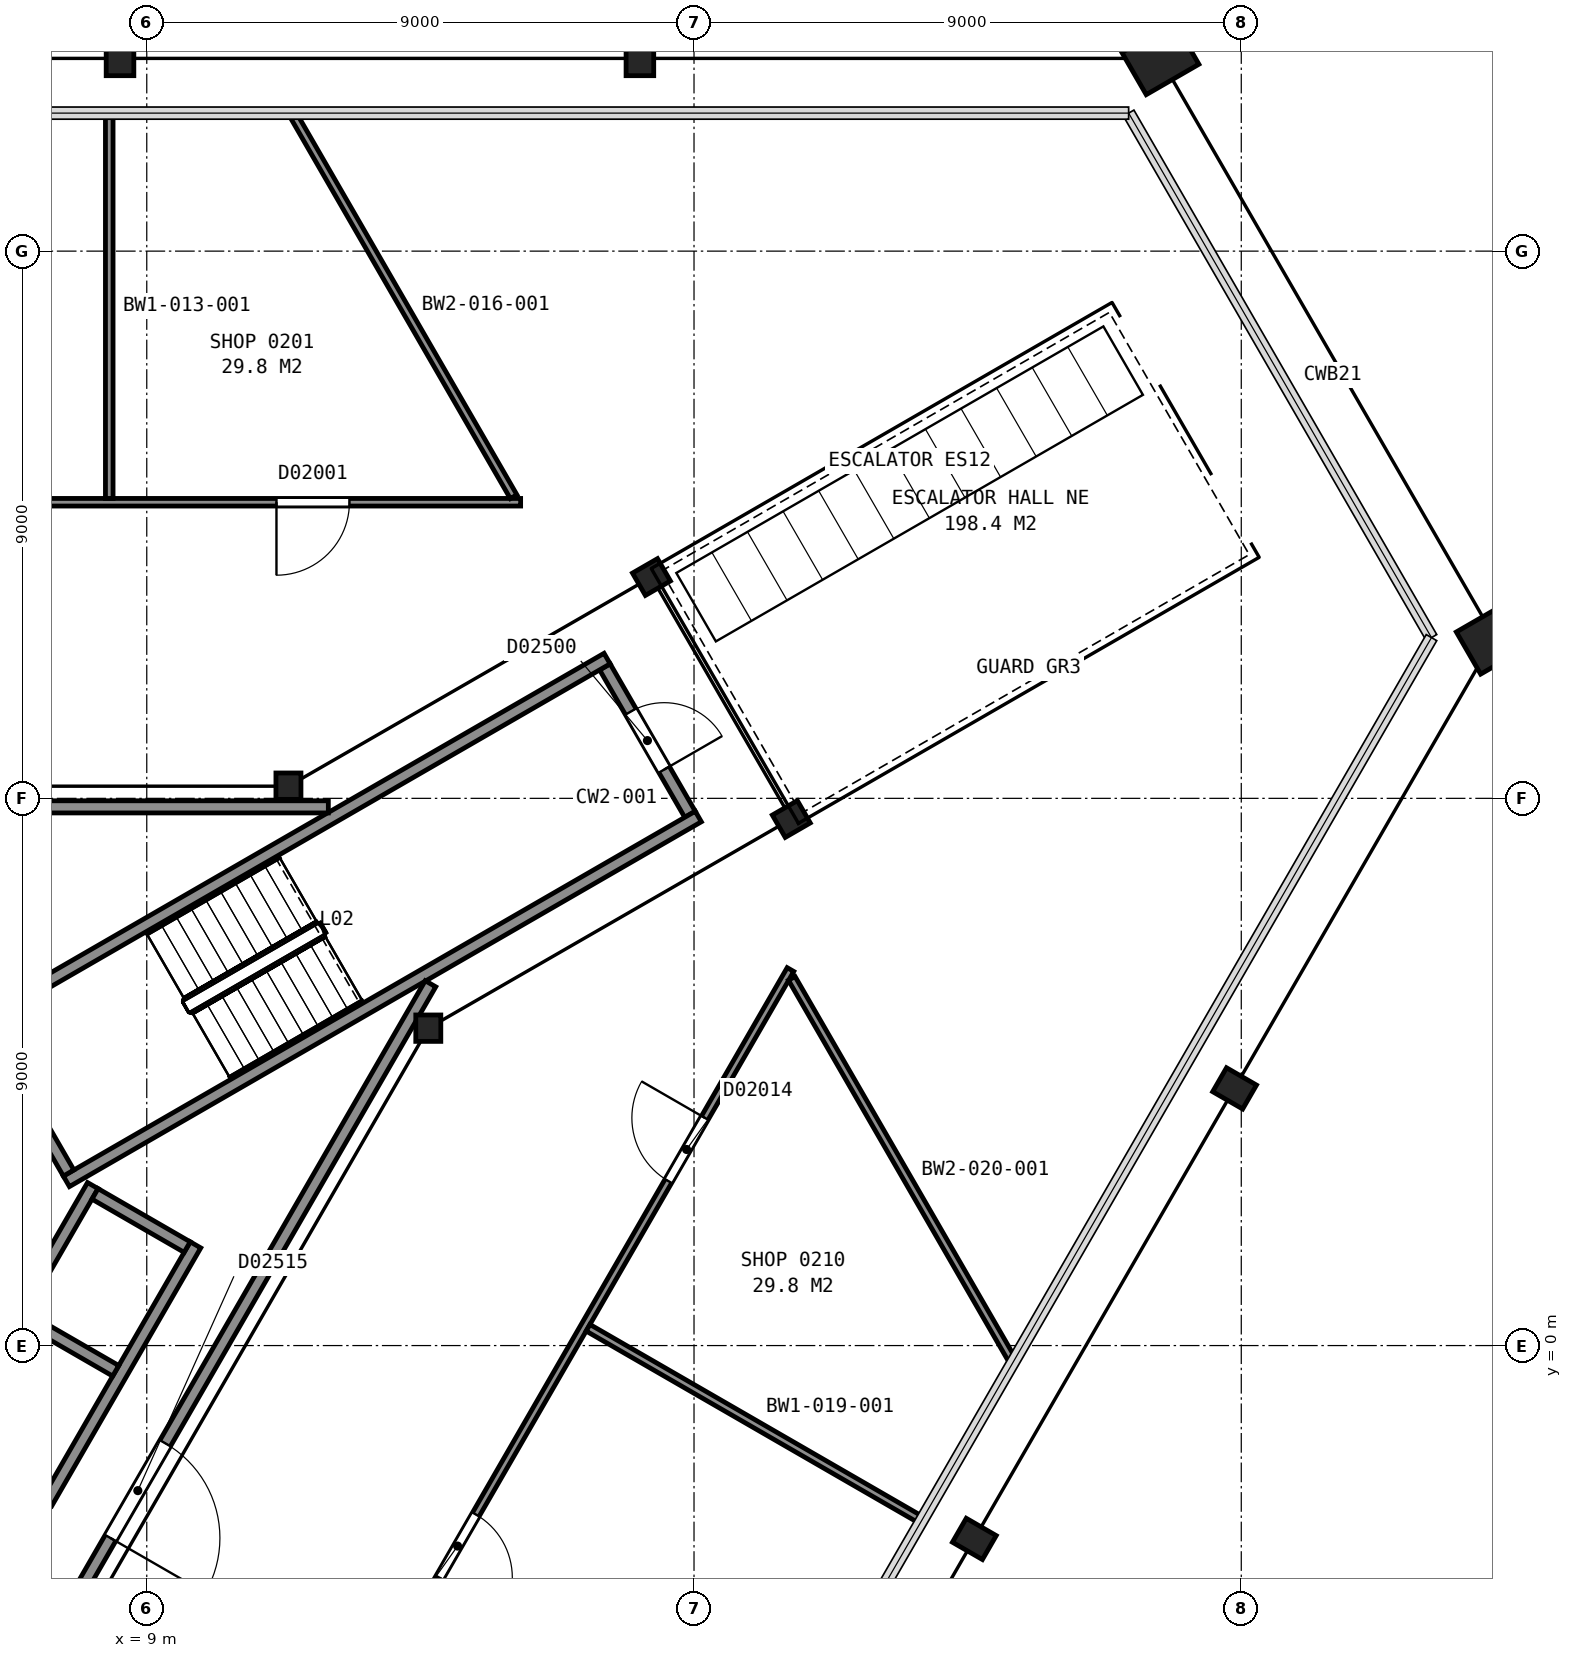
"""IFC4 building model, lengths in metres.
Left out: names, types, materials, properties, quantities, classifications, styles, units other than length and angle.
Written with IfcOpenShell. Run it as: python <this file> out.ifc"""

import sys

from ifc_helpers import new_model, si_unit, direction, frame, frame_2d, origin, origin_2d, place, context, subcontext, project, spatial, rectangle, hollow_rectangle, i_section, extrude, element, fill, save


model = new_model("IFC4")
c1 = context("Model", 3, precision=1e-05, world=origin(), true_north=direction((0.0, 1.0)))
c2 = subcontext(c1, "Body", "Model", "MODEL_VIEW")
j1 = project(units=[si_unit("LENGTHUNIT", "METRE"), si_unit("PLANEANGLEUNIT", "RADIAN")], contexts=[c1])
p1 = place(None, origin())
s1 = spatial("IfcSite", under=j1, at=p1, CompositionType="ELEMENT")
p2 = place(p1, origin())
s2 = spatial("IfcBuilding", under=s1, at=p2, CompositionType="ELEMENT")
p3 = place(p2, frame((0.0, 0.0, 17.4)))
s3 = spatial("IfcBuildingStorey", under=s2, at=p3, CompositionType="ELEMENT", Elevation=17.4)
p4 = place(p3, frame((25.67, 21.17, 0.0), z_axis=(0.0, 0.0, 1.0), x_axis=(0.5, -0.866025403784, 0.0)))
e1 = element("IfcColumn", 1, at=p4, inside=s3, PredefinedType="COLUMN", context=c2, shape_type="SweptSolid", body=[
    extrude(hollow_rectangle(XDim=0.8, YDim=1.0, WallThickness=0.075, at=origin_2d()), origin(), (0.0, 0.0, 1.0), 5.0),
])
for number, where, z_axis, x_axis in (
    (2, (17.11, 21.17, -0.16), (0.0, 0.0, 1.0), (1.0, 0.0, 0.0)),
    (3, (8.56, 21.17, -0.16), (0.0, 0.0, 1.0), (1.0, 0.0, 0.0)),
    (4, (22.61, -3.18, -0.16), (0.0, 0.0, 1.0), (-0.5, -0.866, 0.0)),
    (5, (26.89, 4.23, -0.16), (0.0, 0.0, 1.0), (-0.5, -0.866, 0.0)),
):
    element("IfcColumn", number, at=place(p3, frame(where, z_axis=z_axis, x_axis=x_axis)), inside=s3, PredefinedType="COLUMN", context=c2, shape_type="SweptSolid", body=[
        extrude(i_section(OverallWidth=0.455, OverallDepth=0.569, WebThickness=0.078, FlangeThickness=0.125, FilletRadius=0.015, at=origin_2d()), origin(), (0.0, 0.0, 1.0), 5.16),
    ])
p5 = place(p3, frame((31.17, 11.64, 0.0), z_axis=(0.0, 0.0, 1.0), x_axis=(0.5, -0.866025403784, 0.0)))
e6 = element("IfcColumn", 6, at=p5, inside=s3, PredefinedType="COLUMN", context=c2, shape_type="SweptSolid", body=[
    extrude(hollow_rectangle(XDim=0.8, YDim=1.0, WallThickness=0.075, at=origin_2d()), origin(), (0.0, 0.0, 1.0), 5.0),
])
p6 = place(p3, frame((13.63, 5.22, 0.0), z_axis=(0.0, 0.0, 1.0), x_axis=(1.0, 0.0, 0.0)))
e7 = element("IfcColumn", 7, at=p6, inside=s3, PredefinedType="COLUMN", context=c2, shape_type="SweptSolid", body=[
    extrude(i_section(OverallWidth=0.411, OverallDepth=0.434, WebThickness=0.036, FlangeThickness=0.057, FilletRadius=0.015, at=origin_2d()), origin(), (0.0, 0.0, 1.0), 5.0),
])
for number, where, z_axis, x_axis in (
    (8, (19.6, 8.66, 0.0), (0.0, 0.0, 1.0), (0.5, -0.866, 0.0)),
    (9, (17.3, 12.64, 0.0), (0.0, 0.0, 1.0), (0.5, -0.866, 0.0)),
):
    element("IfcColumn", number, at=place(p3, frame(where, z_axis=z_axis, x_axis=x_axis)), inside=s3, PredefinedType="COLUMN", context=c2, shape_type="SweptSolid", body=[
        extrude(i_section(OverallWidth=0.424, OverallDepth=0.475, WebThickness=0.048, FlangeThickness=0.077, FilletRadius=0.015, at=origin_2d()), origin(), (0.0, 0.0, 1.0), 5.0),
    ])
p7 = place(p3, frame((11.33, 9.2, 0.0), z_axis=(0.0, 0.0, 1.0), x_axis=(1.0, 0.0, 0.0)))
e10 = element("IfcColumn", 10, at=p7, inside=s3, PredefinedType="COLUMN", context=c2, shape_type="SweptSolid", body=[
    extrude(i_section(OverallWidth=0.411, OverallDepth=0.434, WebThickness=0.036, FlangeThickness=0.057, FilletRadius=0.015, at=origin_2d()), origin(), (0.0, 0.0, 1.0), 5.0),
])
p8 = place(p3, frame((17.934, 8.738, 0.0), z_axis=(0.0, 0.0, 1.0), x_axis=(-0.49998411664, 0.866034573852, 0.0)))
e11 = element("IfcWall", 11, at=p8, inside=s3, PredefinedType="PARTITIONING", context=c2, shape_type="SweptSolid", body=[
    extrude(rectangle(XDim=2.8, YDim=0.2, at=frame_2d((1.4, 0.0))), origin(), (0.0, 0.0, 1.0), 4.75),
])
p9 = place(p8, frame((0.85, 0.0, 0.0)))
e12 = element("IfcOpeningElement", 12, at=p9, cuts=e11, PredefinedType="OPENING", context=c2, shape_type="SweptSolid", body=[
    extrude(rectangle(XDim=1.1, YDim=2.1, at=frame_2d((0.55, 1.05))), frame((0.0, 0.11, 0.0), z_axis=(0.0, -1.0, 0.0), x_axis=(1.0, 0.0, 0.0)), (0.0, 0.0, 1.0), 0.22),
])
for number, where, z_axis, x_axis in (
    (13, (6.178, 5.299, 0.0), (0.0, 0.0, 1.0), (0.866, 0.5, 0.0)),
    (14, (7.678, 2.701, 0.0), (0.0, 0.0, 1.0), (0.866, 0.5, 0.0)),
):
    element("IfcWall", number, at=place(p3, frame(where, z_axis=z_axis, x_axis=x_axis)), inside=s3, PredefinedType="PARTITIONING", context=c2, shape_type="SweptSolid", body=[
        extrude(rectangle(XDim=12.0, YDim=0.2, at=frame_2d((6.0, 0.0))), origin(), (0.0, 0.0, 1.0), 4.75),
    ])
p10 = place(p3, frame((7.715, 2.838, 0.0), z_axis=(0.0, 0.0, 1.0), x_axis=(-0.500049511043, 0.865996816683, 0.0)))
e15 = element("IfcWall", 15, at=p10, inside=s3, PredefinedType="PARTITIONING", context=c2, shape_type="SweptSolid", body=[
    extrude(rectangle(XDim=2.8, YDim=0.2, at=frame_2d((1.4, 0.0))), origin(), (0.0, 0.0, 1.0), 4.75),
])
p11 = place(p3, frame((7.351, -2.587, 0.0), z_axis=(0.0, 0.0, 1.0), x_axis=(0.500002801628, 0.866023786258, 0.0)))
e16 = element("IfcWall", 16, at=p11, inside=s3, PredefinedType="PARTITIONING", context=c2, shape_type="SweptSolid", body=[
    extrude(rectangle(XDim=4.9, YDim=0.2, at=frame_2d((2.45, 0.0))), origin(), (0.0, 0.0, 1.0), 5.0),
])
p12 = place(p3, frame((5.663, -1.612, 0.0), z_axis=(0.0, 0.0, 1.0), x_axis=(0.49998122708, 0.866036242063, 0.0)))
e17 = element("IfcWall", 17, at=p12, inside=s3, PredefinedType="PARTITIONING", context=c2, shape_type="SweptSolid", body=[
    extrude(rectangle(XDim=4.9, YDim=0.2, at=frame_2d((2.45, 0.0))), origin(), (0.0, 0.0, 1.0), 5.0),
])
p13 = place(p3, frame((9.665, 1.62, 0.0), z_axis=(0.0, 0.0, 1.0), x_axis=(-0.866002029911, 0.500040482552, 0.0)))
e18 = element("IfcWall", 18, at=p13, inside=s3, PredefinedType="PARTITIONING", context=c2, shape_type="SweptSolid", body=[
    extrude(rectangle(XDim=1.75, YDim=0.2, at=frame_2d((0.875, 0.0))), origin(), (0.0, 0.0, 1.0), 5.0),
])
p14 = place(p3, frame((8.49, -0.416, 0.0), z_axis=(0.0, 0.0, 1.0), x_axis=(-0.866036909293, 0.499980071345, 0.0)))
e19 = element("IfcWall", 19, at=p14, inside=s3, PredefinedType="PARTITIONING", context=c2, shape_type="SweptSolid", body=[
    extrude(rectangle(XDim=1.75, YDim=0.2, at=frame_2d((0.875, 0.0))), origin(), (0.0, 0.0, 1.0), 5.0),
])
p15 = place(p3, frame((11.986, 8.86, 0.0), z_axis=(0.0, 0.0, 1.0), x_axis=(-1.0, 0.0, 0.0)))
e20 = element("IfcWall", 20, at=p15, inside=s3, PredefinedType="PARTITIONING", context=c2, shape_type="SweptSolid", body=[
    extrude(rectangle(XDim=23.967, YDim=0.2, at=frame_2d((11.983, 0.0))), origin(), (0.0, 0.0, 1.0), 4.75),
])
p16 = place(p15, frame((7.596, 0.0, 0.0)))
e21 = element("IfcOpeningElement", 21, at=p16, cuts=e20, PredefinedType="OPENING", context=c2, shape_type="SweptSolid", body=[
    extrude(rectangle(XDim=1.8, YDim=2.1, at=frame_2d((0.9, 1.05))), frame((0.0, 0.11, 0.0), z_axis=(0.0, -1.0, 0.0), x_axis=(1.0, 0.0, 0.0)), (0.0, 0.0, 1.0), 0.22),
])
p17 = place(p3, frame((3.703, -11.306, 0.0), z_axis=(0.0, 0.0, 1.0), x_axis=(0.500006692285, 0.866021539957, 0.0)))
e22 = element("IfcWall", 22, at=p17, inside=s3, PredefinedType="PARTITIONING", context=c2, shape_type="SweptSolid", body=[
    extrude(rectangle(XDim=19.926, YDim=0.2, at=frame_2d((9.963, 0.0))), origin(), (0.0, 0.0, 1.0), 4.75),
])
p18 = place(p17, frame((9.4, 0.0, 0.0)))
e23 = element("IfcOpeningElement", 23, at=p18, cuts=e22, PredefinedType="OPENING", context=c2, shape_type="SweptSolid", body=[
    extrude(rectangle(XDim=1.8, YDim=2.1, at=frame_2d((0.9, 1.05))), frame((0.0, 0.11, 0.0), z_axis=(0.0, -1.0, 0.0), x_axis=(1.0, 0.0, 0.0)), (0.0, 0.0, 1.0), 0.22),
])
p19 = place(p3, frame((-15.148, 13.87, 0.0), z_axis=(0.0, 0.0, 1.0), x_axis=(1.0, 0.0, 0.0)))
e24 = element("IfcWall", 24, at=p19, inside=s3, PredefinedType="PARTITIONING", context=c2, shape_type="SweptSolid", body=[
    extrude(rectangle(XDim=30.297, YDim=0.125, at=frame_2d((15.148, 0.0))), origin(), (0.0, 0.0, 1.0), 3.853),
])
p20 = place(p19, frame((26.281, 0.0, 0.0)))
e25 = element("IfcOpeningElement", 25, at=p20, cuts=e24, PredefinedType="OPENING", context=c2, shape_type="SweptSolid", body=[
    extrude(rectangle(XDim=1.2, YDim=2.1, at=frame_2d((0.6, 1.05))), frame((0.0, 0.073, 0.0), z_axis=(0.0, -1.0, 0.0), x_axis=(1.0, 0.0, 0.0)), (0.0, 0.0, 1.0), 0.145),
])
p21 = place(p19, frame((18.749, 0.0, 0.0)))
e26 = element("IfcOpeningElement", 26, at=p21, cuts=e24, PredefinedType="OPENING", context=c2, shape_type="SweptSolid", body=[
    extrude(rectangle(XDim=1.2, YDim=2.1, at=frame_2d((0.6, 1.05))), frame((0.0, 0.073, 0.0), z_axis=(0.0, -1.0, 0.0), x_axis=(1.0, 0.0, 0.0)), (0.0, 0.0, 1.0), 0.145),
])
p22 = place(p19, frame((10.365, 0.0, 0.0)))
e27 = element("IfcOpeningElement", 27, at=p22, cuts=e24, PredefinedType="OPENING", context=c2, shape_type="SweptSolid", body=[
    extrude(rectangle(XDim=1.2, YDim=2.1, at=frame_2d((0.6, 1.05))), frame((0.0, 0.073, 0.0), z_axis=(0.0, -1.0, 0.0), x_axis=(1.0, 0.0, 0.0)), (0.0, 0.0, 1.0), 0.145),
])
p23 = place(p19, frame((2.812, 0.0, 0.0)))
e28 = element("IfcOpeningElement", 28, at=p23, cuts=e24, PredefinedType="OPENING", context=c2, shape_type="SweptSolid", body=[
    extrude(rectangle(XDim=1.2, YDim=2.1, at=frame_2d((0.6, 1.05))), frame((0.0, 0.073, 0.0), z_axis=(0.0, -1.0, 0.0), x_axis=(1.0, 0.0, 0.0)), (0.0, 0.0, 1.0), 0.145),
])
p24 = place(p3, frame((19.586, 6.184, 0.0), z_axis=(0.0, 0.0, 1.0), x_axis=(-0.499994028088, -0.866028851642, 0.0)))
e29 = element("IfcWall", 29, at=p24, inside=s3, PredefinedType="PARTITIONING", context=c2, shape_type="SweptSolid", body=[
    extrude(rectangle(XDim=30.297, YDim=0.125, at=frame_2d((15.148, 0.0))), origin(), (0.0, 0.0, 1.0), 3.853),
])
p25 = place(p24, frame((26.285, 0.0, 0.0)))
e30 = element("IfcOpeningElement", 30, at=p25, cuts=e29, PredefinedType="OPENING", context=c2, shape_type="SweptSolid", body=[
    extrude(rectangle(XDim=1.2, YDim=2.1, at=frame_2d((0.6, 1.05))), frame((0.0, 0.073, 0.0), z_axis=(0.0, -1.0, 0.0), x_axis=(1.0, 0.0, 0.0)), (0.0, 0.0, 1.0), 0.145),
])
p26 = place(p24, frame((18.832, 0.0, 0.0)))
e31 = element("IfcOpeningElement", 31, at=p26, cuts=e29, PredefinedType="OPENING", context=c2, shape_type="SweptSolid", body=[
    extrude(rectangle(XDim=1.0, YDim=2.1, at=frame_2d((0.5, 1.05))), frame((0.0, 0.073, 0.0), z_axis=(0.0, -1.0, 0.0), x_axis=(1.0, 0.0, 0.0)), (0.0, 0.0, 1.0), 0.145),
])
p27 = place(p24, frame((10.349, 0.0, 0.0)))
e32 = element("IfcOpeningElement", 32, at=p27, cuts=e29, PredefinedType="OPENING", context=c2, shape_type="SweptSolid", body=[
    extrude(rectangle(XDim=1.2, YDim=2.1, at=frame_2d((0.6, 1.05))), frame((0.0, 0.073, 0.0), z_axis=(0.0, -1.0, 0.0), x_axis=(1.0, 0.0, 0.0)), (0.0, 0.0, 1.0), 0.145),
])
p28 = place(p24, frame((2.817, 0.0, 0.0)))
e33 = element("IfcOpeningElement", 33, at=p28, cuts=e29, PredefinedType="OPENING", context=c2, shape_type="SweptSolid", body=[
    extrude(rectangle(XDim=1.2, YDim=2.1, at=frame_2d((0.6, 1.05))), frame((0.0, 0.073, 0.0), z_axis=(0.0, -1.0, 0.0), x_axis=(1.0, 0.0, 0.0)), (0.0, 0.0, 1.0), 0.145),
])
p29 = place(p3, frame((8.383, 13.933, 0.0), z_axis=(0.0, 0.0, 1.0), x_axis=(0.0, 1.0, 0.0)))
e34 = element("IfcWall", 34, at=p29, inside=s3, PredefinedType="PARTITIONING", context=c2, shape_type="SweptSolid", body=[
    extrude(rectangle(XDim=6.337, YDim=0.125, at=frame_2d((3.169, 0.0))), origin(), (0.0, 0.0, 1.0), 3.853),
])
p30 = place(p3, frame((11.391, 20.27, 0.0), z_axis=(0.0, 0.0, 1.0), x_axis=(0.499977739203, -0.86603825568, 0.0)))
e35 = element("IfcWall", 35, at=p30, inside=s3, PredefinedType="PARTITIONING", context=c2, shape_type="SweptSolid", body=[
    extrude(rectangle(XDim=7.285, YDim=0.125, at=frame_2d((3.643, 0.0))), origin(), (0.0, 0.0, 1.0), 4.84),
])
p31 = place(p3, frame((16.257, 0.293, 0.0), z_axis=(0.0, 0.0, 1.0), x_axis=(0.866118237319, -0.499839173118, 0.0)))
e36 = element("IfcWall", 36, at=p31, inside=s3, PredefinedType="PARTITIONING", context=c2, shape_type="SweptSolid", body=[
    extrude(rectangle(XDim=6.337, YDim=0.125, at=frame_2d((3.169, 0.0))), origin(), (0.0, 0.0, 1.0), 3.853),
])
p32 = place(p3, frame((19.607, 6.039, 0.0), z_axis=(0.0, 0.0, 1.0), x_axis=(0.500002873931, -0.866023744513, 0.0)))
e37 = element("IfcWall", 37, at=p32, inside=s3, PredefinedType="PARTITIONING", context=c2, shape_type="SweptSolid", body=[
    extrude(rectangle(XDim=7.285, YDim=0.125, at=frame_2d((3.643, 0.0))), origin(), (0.0, 0.0, 1.0), 4.84),
])
p33 = place(p9, origin())
e38 = element("IfcDoor", 38, at=p33, inside=s3, OperationType="SINGLE_SWING_LEFT", PredefinedType="DOOR", context=c2, shape_type="SweptSolid", body=[
    extrude(rectangle(XDim=1.1, YDim=2.1, at=frame_2d((0.55, 1.05))), frame((0.0, 0.025, 0.0), z_axis=(0.0, -1.0, 0.0), x_axis=(1.0, 0.0, 0.0)), (0.0, 0.0, 1.0), 0.05),
])
fill(e12, e38)
p34 = place(p18, origin())
e39 = element("IfcDoor", 39, at=p34, inside=s3, OperationType="DOUBLE_DOOR_SINGLE_SWING", PredefinedType="DOOR", context=c2, shape_type="SweptSolid", body=[
    extrude(rectangle(XDim=1.8, YDim=2.1, at=frame_2d((0.9, 1.05))), frame((0.0, 0.025, 0.0), z_axis=(0.0, -1.0, 0.0), x_axis=(1.0, 0.0, 0.0)), (0.0, 0.0, 1.0), 0.05),
])
fill(e23, e39)
p35 = place(p20, origin())
e40 = element("IfcDoor", 40, at=p35, inside=s3, OperationType="SINGLE_SWING_LEFT", PredefinedType="DOOR", context=c2, shape_type="SweptSolid", body=[
    extrude(rectangle(XDim=1.2, YDim=2.1, at=frame_2d((0.6, 1.05))), frame((0.0, 0.025, 0.0), z_axis=(0.0, -1.0, 0.0), x_axis=(1.0, 0.0, 0.0)), (0.0, 0.0, 1.0), 0.05),
])
fill(e25, e40)
p36 = place(p27, origin())
e41 = element("IfcDoor", 41, at=p36, inside=s3, OperationType="SINGLE_SWING_RIGHT", PredefinedType="DOOR", context=c2, shape_type="SweptSolid", body=[
    extrude(rectangle(XDim=1.2, YDim=2.1, at=frame_2d((0.6, 1.05))), frame((0.0, 0.025, 0.0), z_axis=(0.0, -1.0, 0.0), x_axis=(1.0, 0.0, 0.0)), (0.0, 0.0, 1.0), 0.05),
])
fill(e32, e41)
p37 = place(p28, origin())
e42 = element("IfcDoor", 42, at=p37, inside=s3, OperationType="SINGLE_SWING_LEFT", PredefinedType="DOOR", context=c2, shape_type="SweptSolid", body=[
    extrude(rectangle(XDim=1.2, YDim=2.1, at=frame_2d((0.6, 1.05))), frame((0.0, 0.025, 0.0), z_axis=(0.0, -1.0, 0.0), x_axis=(1.0, 0.0, 0.0)), (0.0, 0.0, 1.0), 0.05),
])
fill(e33, e42)
save(model, sys.argv[1])
